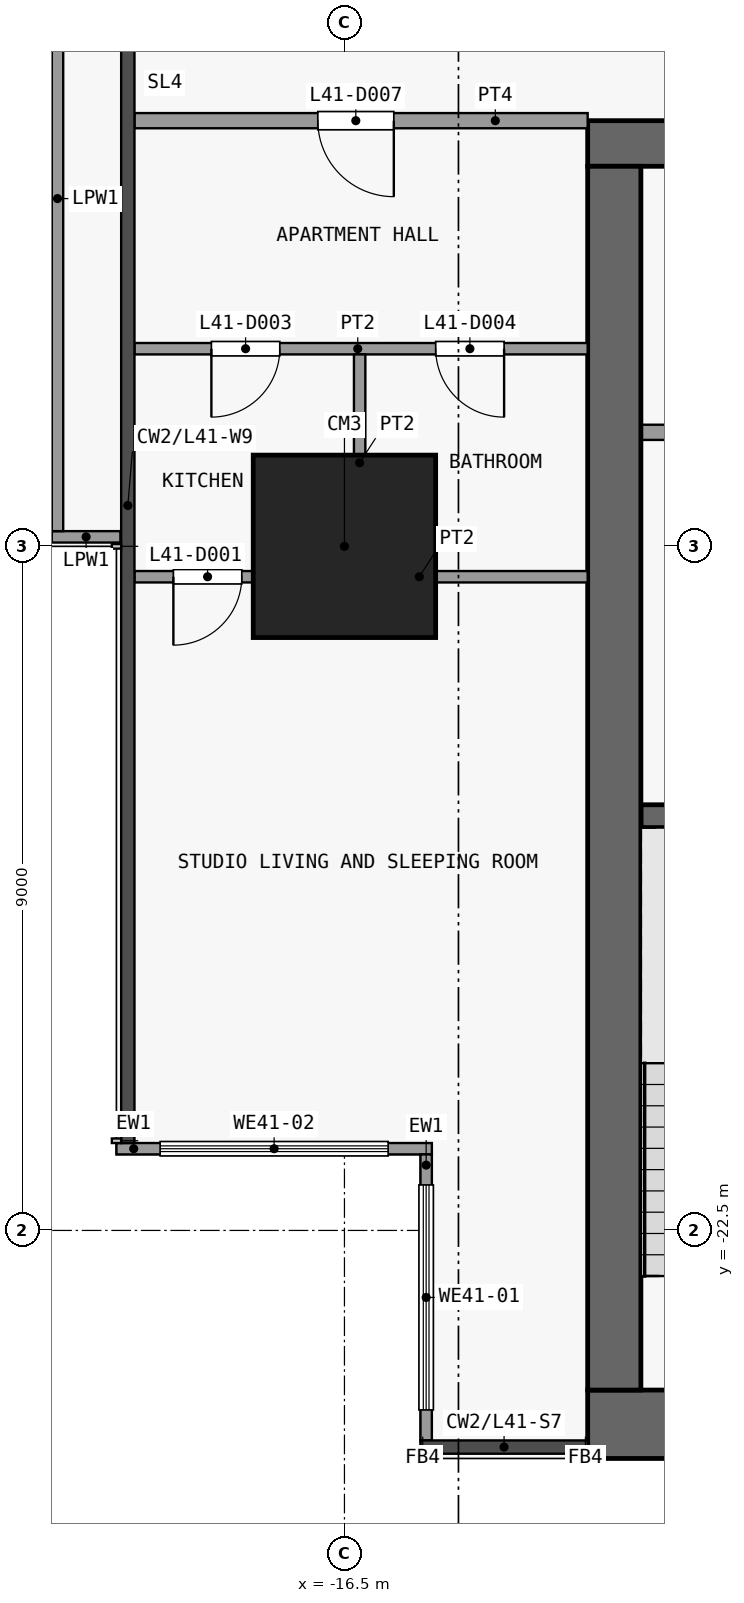
"""IFC4 building model, lengths in metres.
Left out: names, types, materials, properties, quantities, classifications, styles, units other than length and angle.
Written with IfcOpenShell. Run it as: python <this file> out.ifc"""

import sys

from ifc_helpers import new_model, si_unit, direction, frame, frame_2d, origin, origin_2d, place, context, subcontext, project, spatial, rectangle, extrude, element, fill, save


model = new_model("IFC4")
c1 = context("Model", 3, precision=1e-05, world=origin(), true_north=direction((0.0, 1.0)))
c2 = subcontext(c1, "Body", "Model", "MODEL_VIEW")
j1 = project(units=[si_unit("LENGTHUNIT", "METRE"), si_unit("PLANEANGLEUNIT", "RADIAN")], contexts=[c1])
p1 = place(None, origin())
s1 = spatial("IfcSite", under=j1, at=p1, CompositionType="ELEMENT")
p2 = place(p1, origin())
s2 = spatial("IfcBuilding", under=s1, at=p2, CompositionType="ELEMENT")
p3 = place(p2, frame((0.0, 0.0, 167.3)))
s3 = spatial("IfcBuildingStorey", under=s2, at=p3, CompositionType="ELEMENT", Elevation=167.3)
p4 = place(p3, frame((-16.5, -13.5, 0.0), z_axis=(0.0, 0.0, 1.0), x_axis=(1.0, 0.0, 0.0)))
e1 = element("IfcColumn", 1, at=p4, inside=s3, PredefinedType="COLUMN", context=c2, shape_type="SweptSolid", body=[
    extrude(rectangle(XDim=2.4, YDim=2.4, at=origin_2d()), origin(), (0.0, 0.0, 1.0), 3.6),
])
p5 = place(p3, frame((-13.3, -25.05, 0.0), z_axis=(0.0, 0.0, 1.0), x_axis=(1.0, 0.0, 0.0)))
e2 = element("IfcWall", 2, at=p5, inside=s3, PredefinedType="SHEAR", context=c2, shape_type="SweptSolid", body=[
    extrude(rectangle(XDim=26.6, YDim=0.9, at=frame_2d((13.3, 0.0))), origin(), (0.0, 0.0, 1.0), 3.3),
])
p6 = place(p3, frame((-13.3, -8.2, 0.0), z_axis=(0.0, 0.0, 1.0), x_axis=(1.0, 0.0, 0.0)))
e3 = element("IfcWall", 3, at=p6, inside=s3, PredefinedType="SHEAR", context=c2, shape_type="SweptSolid", body=[
    extrude(rectangle(XDim=26.6, YDim=0.6, at=frame_2d((13.3, 0.0))), origin(), (0.0, 0.0, 1.0), 3.3),
])
p7 = place(p6, frame((7.6, 0.0, 0.0)))
e4 = element("IfcOpeningElement", 4, at=p7, cuts=e3, PredefinedType="OPENING", context=c2, shape_type="SweptSolid", body=[
    extrude(rectangle(XDim=1.8, YDim=2.1, at=frame_2d((0.9, 1.05))), frame((0.0, 0.31, 0.0), z_axis=(0.0, -1.0, 0.0), x_axis=(1.0, 0.0, 0.0)), (0.0, 0.0, 1.0), 0.62),
])
p8 = place(p6, frame((17.2, 0.0, 0.0)))
e5 = element("IfcOpeningElement", 5, at=p8, cuts=e3, PredefinedType="OPENING", context=c2, shape_type="SweptSolid", body=[
    extrude(rectangle(XDim=1.8, YDim=2.1, at=frame_2d((0.9, 1.05))), frame((0.0, 0.31, 0.0), z_axis=(0.0, -1.0, 0.0), x_axis=(1.0, 0.0, 0.0)), (0.0, 0.0, 1.0), 0.62),
])
p9 = place(p6, frame((2.525, 0.0, 0.0)))
e6 = element("IfcOpeningElement", 6, at=p9, cuts=e3, PredefinedType="OPENING", context=c2, shape_type="SweptSolid", body=[
    extrude(rectangle(XDim=0.9, YDim=2.1, at=frame_2d((0.45, 1.05))), frame((0.0, 0.31, 0.0), z_axis=(0.0, -1.0, 0.0), x_axis=(1.0, 0.0, 0.0)), (0.0, 0.0, 1.0), 0.62),
])
p10 = place(p6, frame((23.875, 0.0, 0.0)))
e7 = element("IfcOpeningElement", 7, at=p10, cuts=e3, PredefinedType="OPENING", context=c2, shape_type="SweptSolid", body=[
    extrude(rectangle(XDim=1.2, YDim=2.1, at=frame_2d((0.6, 1.05))), frame((0.0, 0.31, 0.0), z_axis=(0.0, -1.0, 0.0), x_axis=(1.0, 0.0, 0.0)), (0.0, 0.0, 1.0), 0.62),
])
p11 = place(p3, frame((-12.95, -24.6, 0.0), z_axis=(0.0, 0.0, 1.0), x_axis=(0.0, 1.0, 0.0)))
e8 = element("IfcWall", 8, at=p11, inside=s3, PredefinedType="SHEAR", context=c2, shape_type="SweptSolid", body=[
    extrude(rectangle(XDim=16.1, YDim=0.7, at=frame_2d((8.05, 0.0))), origin(), (0.0, 0.0, 1.0), 3.3),
])
p12 = place(p3, frame((-12.6, -17.05, 0.0), z_axis=(0.0, 0.0, 1.0), x_axis=(1.0, 0.0, 0.0)))
e9 = element("IfcWall", 9, at=p12, inside=s3, PredefinedType="SHEAR", context=c2, shape_type="SweptSolid", body=[
    extrude(rectangle(XDim=3.1, YDim=0.3, at=frame_2d((1.55, 0.0))), origin(), (0.0, 0.0, 1.0), 3.3),
])
p13 = place(p3, frame((-12.6, -12.0, 0.0), z_axis=(0.0, 0.0, 1.0), x_axis=(1.0, 0.0, 0.0)))
e10 = element("IfcWall", 10, at=p13, inside=s3, PredefinedType="PARTITIONING", context=c2, shape_type="SweptSolid", body=[
    extrude(rectangle(XDim=1.45, YDim=0.2, at=frame_2d((0.725, 0.0))), origin(), (0.0, 0.0, 1.0), 3.3),
])
p14 = place(p3, frame((-15.425, -25.262, 0.0), z_axis=(0.0, 0.0, 1.0), x_axis=(0.0, 1.0, 0.0)))
e11 = element("IfcWall", 11, at=p14, inside=s3, PredefinedType="SOLIDWALL", context=c2, shape_type="SweptSolid", body=[
    extrude(rectangle(XDim=3.762, YDim=0.15, at=frame_2d((1.881, 0.0))), origin(), (0.0, 0.0, 1.0), 3.3),
])
p15 = place(p14, frame((0.401, 0.0, 0.9)))
e12 = element("IfcOpeningElement", 12, at=p15, cuts=e11, PredefinedType="OPENING", context=c2, shape_type="SweptSolid", body=[
    extrude(rectangle(XDim=2.96, YDim=2.4, at=frame_2d((1.48, 1.2))), frame((0.0, 0.085, 0.0), z_axis=(0.0, -1.0, 0.0), x_axis=(1.0, 0.0, 0.0)), (0.0, 0.0, 1.0), 0.17),
])
p16 = place(p3, frame((-15.35, -21.425, 0.0), z_axis=(0.0, 0.0, 1.0), x_axis=(-1.0, 0.0, 0.0)))
e13 = element("IfcWall", 13, at=p16, inside=s3, PredefinedType="SOLIDWALL", context=c2, shape_type="SweptSolid", body=[
    extrude(rectangle(XDim=4.15, YDim=0.15, at=frame_2d((2.075, 0.0))), origin(), (0.0, 0.0, 1.0), 3.3),
])
p17 = place(p16, frame((0.575, 0.0, 0.9)))
e14 = element("IfcOpeningElement", 14, at=p17, cuts=e13, PredefinedType="OPENING", context=c2, shape_type="SweptSolid", body=[
    extrude(rectangle(XDim=3.0, YDim=2.4, at=frame_2d((1.5, 1.2))), frame((0.0, 0.085, 0.0), z_axis=(0.0, -1.0, 0.0), x_axis=(1.0, 0.0, 0.0)), (0.0, 0.0, 1.0), 0.17),
])
p18 = place(p3, frame((-19.448, -13.375, 0.0), z_axis=(0.0, 0.0, 1.0), x_axis=(-1.0, 0.0, 0.0)))
e15 = element("IfcWall", 15, at=p18, inside=s3, PredefinedType="PARAPET", context=c2, shape_type="SweptSolid", body=[
    extrude(rectangle(XDim=0.903, YDim=0.15, at=frame_2d((0.451, 0.0))), origin(), (0.0, 0.0, 1.0), 1.15),
])
p19 = place(p3, frame((-20.275, -13.3, 0.0), z_axis=(0.0, 0.0, 1.0), x_axis=(0.0, 1.0, 0.0)))
e16 = element("IfcWall", 16, at=p19, inside=s3, PredefinedType="PARAPET", context=c2, shape_type="SweptSolid", body=[
    extrude(rectangle(XDim=8.75, YDim=0.15, at=frame_2d((4.375, 0.0))), origin(), (0.0, 0.0, 1.0), 1.15),
])
p20 = place(p3, frame((-19.262, -13.9, 0.0), z_axis=(0.0, 0.0, 1.0), x_axis=(1.0, 0.0, 0.0)))
e17 = element("IfcWall", 17, at=p20, inside=s3, PredefinedType="PARTITIONING", context=c2, shape_type="SweptSolid", body=[
    extrude(rectangle(XDim=5.962, YDim=0.15, at=frame_2d((2.981, 0.0))), origin(), (0.0, 0.0, 1.0), 3.3),
])
p21 = place(p20, frame((0.512, 0.0, 0.0)))
e18 = element("IfcOpeningElement", 18, at=p21, cuts=e17, PredefinedType="OPENING", context=c2, shape_type="SweptSolid", body=[
    extrude(rectangle(XDim=0.9, YDim=2.1, at=frame_2d((0.45, 1.05))), frame((0.0, 0.085, 0.0), z_axis=(0.0, -1.0, 0.0), x_axis=(1.0, 0.0, 0.0)), (0.0, 0.0, 1.0), 0.17),
])
p22 = place(p3, frame((-19.262, -10.9, 0.0), z_axis=(0.0, 0.0, 1.0), x_axis=(1.0, 0.0, 0.0)))
e19 = element("IfcWall", 19, at=p22, inside=s3, PredefinedType="PARTITIONING", context=c2, shape_type="SweptSolid", body=[
    extrude(rectangle(XDim=5.962, YDim=0.15, at=frame_2d((2.981, 0.0))), origin(), (0.0, 0.0, 1.0), 3.3),
])
p23 = place(p22, frame((1.012, 0.0, 0.0)))
e20 = element("IfcOpeningElement", 20, at=p23, cuts=e19, PredefinedType="OPENING", context=c2, shape_type="SweptSolid", body=[
    extrude(rectangle(XDim=0.9, YDim=2.1, at=frame_2d((0.45, 1.05))), frame((0.0, 0.085, 0.0), z_axis=(0.0, -1.0, 0.0), x_axis=(1.0, 0.0, 0.0)), (0.0, 0.0, 1.0), 0.17),
])
p24 = place(p22, frame((3.963, 0.0, 0.0)))
e21 = element("IfcOpeningElement", 21, at=p24, cuts=e19, PredefinedType="OPENING", context=c2, shape_type="SweptSolid", body=[
    extrude(rectangle(XDim=0.9, YDim=2.1, at=frame_2d((0.45, 1.05))), frame((0.0, 0.085, 0.0), z_axis=(0.0, -1.0, 0.0), x_axis=(1.0, 0.0, 0.0)), (0.0, 0.0, 1.0), 0.17),
])
p25 = place(p3, frame((-19.262, -7.9, 0.0), z_axis=(0.0, 0.0, 1.0), x_axis=(1.0, 0.0, 0.0)))
e22 = element("IfcWall", 22, at=p25, inside=s3, PredefinedType="PARTITIONING", context=c2, shape_type="SweptSolid", body=[
    extrude(rectangle(XDim=5.962, YDim=0.2, at=frame_2d((2.981, 0.0))), origin(), (0.0, 0.0, 1.0), 3.3),
])
p26 = place(p25, frame((2.412, 0.0, 0.0)))
e23 = element("IfcOpeningElement", 23, at=p26, cuts=e22, PredefinedType="OPENING", context=c2, shape_type="SweptSolid", body=[
    extrude(rectangle(XDim=1.0, YDim=2.1, at=frame_2d((0.5, 1.05))), frame((0.0, 0.11, 0.0), z_axis=(0.0, -1.0, 0.0), x_axis=(1.0, 0.0, 0.0)), (0.0, 0.0, 1.0), 0.22),
])
p27 = place(p3, frame((-16.3, -13.825, 0.0), z_axis=(0.0, 0.0, 1.0), x_axis=(0.0, 1.0, 0.0)))
e24 = element("IfcWall", 24, at=p27, inside=s3, PredefinedType="PARTITIONING", context=c2, shape_type="SweptSolid", body=[
    extrude(rectangle(XDim=2.85, YDim=0.15, at=frame_2d((1.425, 0.0))), origin(), (0.0, 0.0, 1.0), 3.3),
])
p28 = place(p15, origin())
e25 = element("IfcWindow", 25, at=p28, inside=s3, PartitioningType="SINGLE_PANEL", PredefinedType="WINDOW", context=c2, shape_type="SweptSolid", body=[
    extrude(rectangle(XDim=2.96, YDim=2.4, at=frame_2d((1.48, 1.2))), frame((0.0, 0.03, 0.0), z_axis=(0.0, -1.0, 0.0), x_axis=(1.0, 0.0, 0.0)), (0.0, 0.0, 1.0), 0.06),
])
fill(e12, e25)
p29 = place(p17, origin())
e26 = element("IfcWindow", 26, at=p29, inside=s3, PartitioningType="SINGLE_PANEL", PredefinedType="WINDOW", context=c2, shape_type="SweptSolid", body=[
    extrude(rectangle(XDim=3.0, YDim=2.4, at=frame_2d((1.5, 1.2))), frame((0.0, 0.03, 0.0), z_axis=(0.0, -1.0, 0.0), x_axis=(1.0, 0.0, 0.0)), (0.0, 0.0, 1.0), 0.06),
])
fill(e14, e26)
p30 = place(p21, origin())
e27 = element("IfcDoor", 27, at=p30, inside=s3, OperationType="SINGLE_SWING_LEFT", PredefinedType="DOOR", context=c2, shape_type="SweptSolid", body=[
    extrude(rectangle(XDim=0.9, YDim=2.1, at=frame_2d((0.45, 1.05))), frame((0.0, 0.025, 0.0), z_axis=(0.0, -1.0, 0.0), x_axis=(1.0, 0.0, 0.0)), (0.0, 0.0, 1.0), 0.05),
])
fill(e18, e27)
p31 = place(p23, origin())
e28 = element("IfcDoor", 28, at=p31, inside=s3, OperationType="SINGLE_SWING_LEFT", PredefinedType="DOOR", context=c2, shape_type="SweptSolid", body=[
    extrude(rectangle(XDim=0.9, YDim=2.1, at=frame_2d((0.45, 1.05))), frame((0.0, 0.025, 0.0), z_axis=(0.0, -1.0, 0.0), x_axis=(1.0, 0.0, 0.0)), (0.0, 0.0, 1.0), 0.05),
])
fill(e20, e28)
p32 = place(p24, origin())
e29 = element("IfcDoor", 29, at=p32, inside=s3, OperationType="SINGLE_SWING_RIGHT", PredefinedType="DOOR", context=c2, shape_type="SweptSolid", body=[
    extrude(rectangle(XDim=0.9, YDim=2.1, at=frame_2d((0.45, 1.05))), frame((0.0, 0.025, 0.0), z_axis=(0.0, -1.0, 0.0), x_axis=(1.0, 0.0, 0.0)), (0.0, 0.0, 1.0), 0.05),
])
fill(e21, e29)
p33 = place(p26, origin())
e30 = element("IfcDoor", 30, at=p33, inside=s3, OperationType="SINGLE_SWING_RIGHT", PredefinedType="DOOR", context=c2, shape_type="SweptSolid", body=[
    extrude(rectangle(XDim=1.0, YDim=2.1, at=frame_2d((0.5, 1.05))), frame((0.0, 0.025, 0.0), z_axis=(0.0, -1.0, 0.0), x_axis=(1.0, 0.0, 0.0)), (0.0, 0.0, 1.0), 0.05),
])
fill(e23, e30)
save(model, sys.argv[1])
